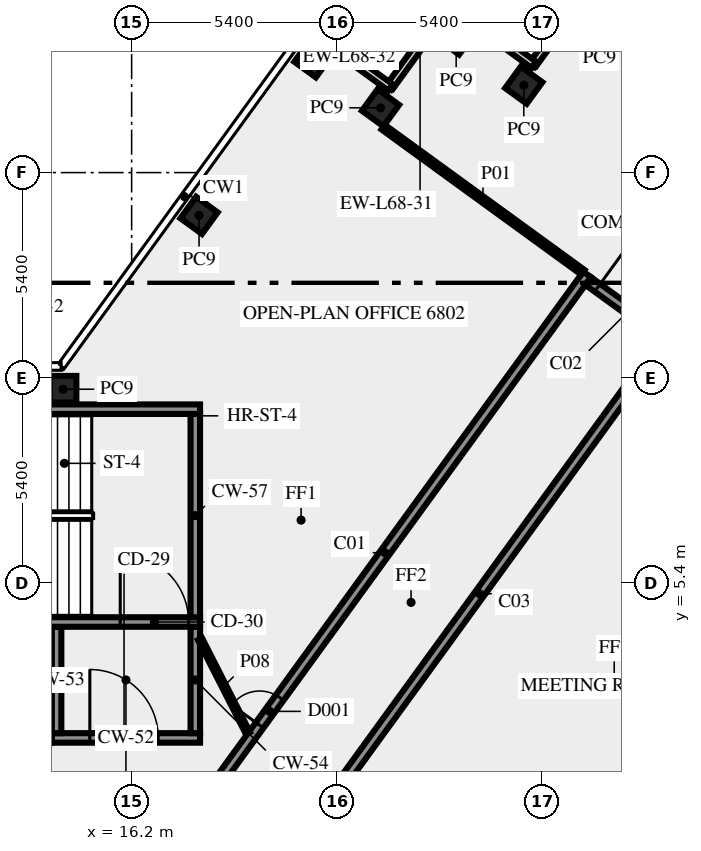
"""IFC4 building model, lengths in metres.
Left out: names, types, materials, properties, quantities, classifications, styles, units other than length and angle.
Written with IfcOpenShell. Run it as: python <this file> out.ifc"""

import sys

from ifc_helpers import new_model, si_unit, direction, frame, frame_2d, origin, origin_2d, place, context, subcontext, project, spatial, rectangle, extrude, element, fill, save


model = new_model("IFC4")
c1 = context("Model", 3, precision=1e-05, world=origin(), true_north=direction((0.0, 1.0)))
c2 = subcontext(c1, "Body", "Model", "MODEL_VIEW")
j1 = project(units=[si_unit("LENGTHUNIT", "METRE"), si_unit("PLANEANGLEUNIT", "RADIAN")], contexts=[c1])
p1 = place(None, origin())
s1 = spatial("IfcSite", under=j1, at=p1, CompositionType="ELEMENT")
p2 = place(p1, origin())
s2 = spatial("IfcBuilding", under=s1, at=p2, CompositionType="ELEMENT")
p3 = place(p2, frame((0.0, 0.0, 293.0)))
s3 = spatial("IfcBuildingStorey", under=s2, at=p3, CompositionType="ELEMENT", Elevation=293.0)
for number, where, z_axis, x_axis in (
    (1, (26.519, 18.5, 0.0), (0.0, 0.0, 1.0), (-0.809, 0.588, 0.0)),
    (2, (24.74, 19.795, 0.0), (0.0, 0.0, 1.0), (-0.588, -0.809, 0.0)),
    (3, (22.749, 17.904, 0.0), (0.0, 0.0, 1.0), (-0.588, -0.809, 0.0)),
    (4, (20.97, 19.195, 0.0), (0.0, 0.0, 1.0), (-0.588, -0.809, 0.0)),
    (5, (17.974, 15.075, 0.0), (0.0, 0.0, 1.0), (-0.588, -0.809, 0.0)),
    (6, (14.395, 10.5, 0.0), (0.0, 0.0, 1.0), (-1.0, 0.0, 0.0)),
):
    element("IfcColumn", number, at=place(p3, frame(where, z_axis=z_axis, x_axis=x_axis)), inside=s3, PredefinedType="COLUMN", context=c2, shape_type="SweptSolid", body=[
        extrude(rectangle(XDim=0.7, YDim=0.7, at=origin_2d()), origin(), (0.0, 0.0, 1.0), 3.65),
    ])
for number, where, z_axis, x_axis in (
    (7, (28.354, 21.247, 0.0), (0.0, 0.0, 1.0), (-0.588, -0.809, 0.0)),
    (8, (26.785, 19.036, 0.0), (0.0, 0.0, 1.0), (-0.809, 0.588, 0.0)),
):
    element("IfcWall", number, at=place(p3, frame(where, z_axis=z_axis, x_axis=x_axis)), inside=s3, PredefinedType="SOLIDWALL", context=c2, shape_type="SweptSolid", body=[
        extrude(rectangle(XDim=2.7, YDim=0.2, at=frame_2d((1.35, 0.0))), origin(), (0.0, 0.0, 1.0), 3.65),
    ])
for number, where, z_axis, x_axis in (
    (9, (24.583, 20.65, 0.0), (0.0, 0.0, 1.0), (-0.588, -0.809, 0.0)),
    (10, (23.013, 18.438, 0.0), (0.0, 0.0, 1.0), (-0.809, 0.588, 0.0)),
):
    element("IfcWall", number, at=place(p3, frame(where, z_axis=z_axis, x_axis=x_axis)), inside=s3, PredefinedType="SOLIDWALL", context=c2, shape_type="SweptSolid", body=[
        extrude(rectangle(XDim=2.7, YDim=0.2, at=frame_2d((1.35, 0.0))), origin(), (0.0, 0.0, 1.0), 3.65),
    ])
p4 = place(p3, frame((14.1, 1.325, 0.0), z_axis=(0.0, 0.0, 1.0), x_axis=(1.0, 0.0, 0.0)))
e11 = element("IfcWall", 11, at=p4, inside=s3, PredefinedType="SHEAR", context=c2, shape_type="SweptSolid", body=[
    extrude(rectangle(XDim=3.9, YDim=0.25, at=frame_2d((1.95, 0.0))), origin(), (0.0, 0.0, 1.0), 3.65),
])
p5 = place(p4, frame((1.0, 0.0, 0.0)))
e12 = element("IfcOpeningElement", 12, at=p5, cuts=e11, PredefinedType="OPENING", context=c2, shape_type="SweptSolid", body=[
    extrude(rectangle(XDim=1.8, YDim=2.1, at=frame_2d((0.9, 1.05))), frame((0.0, 0.135, 0.0), z_axis=(0.0, -1.0, 0.0), x_axis=(1.0, 0.0, 0.0)), (0.0, 0.0, 1.0), 0.27),
])
for number, where, z_axis, x_axis in (
    (13, (14.225, 1.45, 0.0), (0.0, 0.0, 1.0), (0.0, 1.0, 0.0)),
    (14, (17.875, 1.45, 0.0), (0.0, 0.0, 1.0), (0.0, 1.0, 0.0)),
):
    element("IfcWall", number, at=place(p3, frame(where, z_axis=z_axis, x_axis=x_axis)), inside=s3, PredefinedType="SHEAR", context=c2, shape_type="SweptSolid", body=[
        extrude(rectangle(XDim=2.8, YDim=0.25, at=frame_2d((1.4, 0.0))), origin(), (0.0, 0.0, 1.0), 3.65),
    ])
p6 = place(p3, frame((7.5, 4.375, 0.0), z_axis=(0.0, 0.0, 1.0), x_axis=(1.0, 0.0, 0.0)))
e15 = element("IfcWall", 15, at=p6, inside=s3, PredefinedType="SHEAR", context=c2, shape_type="SweptSolid", body=[
    extrude(rectangle(XDim=10.5, YDim=0.25, at=frame_2d((5.25, 0.0))), origin(), (0.0, 0.0, 1.0), 3.65),
])
p7 = place(p6, frame((8.4, 0.0, 0.0)))
e16 = element("IfcOpeningElement", 16, at=p7, cuts=e15, PredefinedType="OPENING", context=c2, shape_type="SweptSolid", body=[
    extrude(rectangle(XDim=1.8, YDim=2.1, at=frame_2d((0.9, 1.05))), frame((0.0, 0.135, 0.0), z_axis=(0.0, -1.0, 0.0), x_axis=(1.0, 0.0, 0.0)), (0.0, 0.0, 1.0), 0.27),
])
p8 = place(p3, frame((17.875, 4.5, 0.0), z_axis=(0.0, 0.0, 1.0), x_axis=(0.0, 1.0, 0.0)))
e17 = element("IfcWall", 17, at=p8, inside=s3, PredefinedType="SHEAR", context=c2, shape_type="SweptSolid", body=[
    extrude(rectangle(XDim=5.35, YDim=0.25, at=frame_2d((2.675, 0.0))), origin(), (0.0, 0.0, 1.0), 3.65),
])
p9 = place(p3, frame((7.5, 9.975, 0.0), z_axis=(0.0, 0.0, 1.0), x_axis=(1.0, 0.0, 0.0)))
e18 = element("IfcWall", 18, at=p9, inside=s3, PredefinedType="SHEAR", context=c2, shape_type="SweptSolid", body=[
    extrude(rectangle(XDim=10.5, YDim=0.25, at=frame_2d((5.25, 0.0))), origin(), (0.0, 0.0, 1.0), 3.65),
])
p10 = place(p9, frame((2.0, 0.0, 1.0)))
e19 = element("IfcOpeningElement", 19, at=p10, cuts=e18, PredefinedType="OPENING", context=c2, shape_type="SweptSolid", body=[
    extrude(rectangle(XDim=1.2, YDim=1.2, at=frame_2d((0.6, 0.6))), frame((0.0, 0.135, 0.0), z_axis=(0.0, -1.0, 0.0), x_axis=(1.0, 0.0, 0.0)), (0.0, 0.0, 1.0), 0.27),
])
p11 = place(p3, frame((17.545, -1.125, 0.0), z_axis=(0.0, 0.0, 1.0), x_axis=(0.58779555165, 0.809009511354, 0.0)))
e20 = element("IfcWall", 20, at=p11, inside=s3, PredefinedType="SOLIDWALL", context=c2, shape_type="SweptSolid", body=[
    extrude(rectangle(XDim=18.103, YDim=0.25, at=frame_2d((9.052, 0.0))), origin(), (0.0, 0.0, 1.0), 3.65),
])
p12 = place(p11, frame((3.441, 0.0, 0.0)))
e21 = element("IfcOpeningElement", 21, at=p12, cuts=e20, PredefinedType="OPENING", context=c2, shape_type="SweptSolid", body=[
    extrude(rectangle(XDim=0.9, YDim=2.1, at=frame_2d((0.45, 1.05))), frame((0.0, 0.135, 0.0), z_axis=(0.0, -1.0, 0.0), x_axis=(1.0, 0.0, 0.0)), (0.0, 0.0, 1.0), 0.27),
])
p13 = place(p3, frame((28.213, 13.346, 0.0), z_axis=(0.0, 0.0, 1.0), x_axis=(0.809006914995, -0.587799125119, 0.0)))
e22 = element("IfcWall", 22, at=p13, inside=s3, PredefinedType="SOLIDWALL", context=c2, shape_type="SweptSolid", body=[
    extrude(rectangle(XDim=2.65, YDim=0.25, at=frame_2d((1.325, 0.0))), origin(), (0.0, 0.0, 1.0), 3.65),
])
p14 = place(p13, frame((0.3, 0.0, 0.0)))
e23 = element("IfcOpeningElement", 23, at=p14, cuts=e22, PredefinedType="OPENING", context=c2, shape_type="SweptSolid", body=[
    extrude(rectangle(XDim=1.8, YDim=2.1, at=frame_2d((0.9, 1.05))), frame((0.0, 0.135, 0.0), z_axis=(0.0, -1.0, 0.0), x_axis=(1.0, 0.0, 0.0)), (0.0, 0.0, 1.0), 0.27),
])
p15 = place(p3, frame((30.183, 11.761, 0.0), z_axis=(0.0, 0.0, 1.0), x_axis=(-0.587781762867, -0.80901952958, 0.0)))
e24 = element("IfcWall", 24, at=p15, inside=s3, PredefinedType="SOLIDWALL", context=c2, shape_type="SweptSolid", body=[
    extrude(rectangle(XDim=16.42, YDim=0.25, at=frame_2d((8.21, 0.0))), origin(), (0.0, 0.0, 1.0), 3.65),
])
p16 = place(p15, frame((0.225, 0.0, 0.0)))
e25 = element("IfcOpeningElement", 25, at=p16, cuts=e24, PredefinedType="OPENING", context=c2, shape_type="SweptSolid", body=[
    extrude(rectangle(XDim=0.9, YDim=2.1, at=frame_2d((0.45, 1.05))), frame((0.0, 0.135, 0.0), z_axis=(0.0, -1.0, 0.0), x_axis=(1.0, 0.0, 0.0)), (0.0, 0.0, 1.0), 0.27),
])
p17 = place(p3, frame((28.073, 13.578, 0.0), z_axis=(0.0, 0.0, 1.0), x_axis=(-0.809000932727, 0.587807358619, 0.0)))
e26 = element("IfcWall", 26, at=p17, inside=s3, PredefinedType="PARTITIONING", context=c2, shape_type="SweptSolid", body=[
    extrude(rectangle(XDim=6.496, YDim=0.15, at=frame_2d((3.248, 0.0))), origin(), (0.0, 0.0, 1.0), 3.65),
])
p18 = place(p3, frame((18.0, 3.925, 0.0), z_axis=(0.0, 0.0, 1.0), x_axis=(0.453950796792, -0.891026752736, 0.0)))
e27 = element("IfcWall", 27, at=p18, inside=s3, PredefinedType="PARTITIONING", context=c2, shape_type="SweptSolid", body=[
    extrude(rectangle(XDim=2.778, YDim=0.12, at=frame_2d((1.389, 0.0))), origin(), (0.0, 0.0, 1.0), 3.65),
])
p19 = place(p5, origin())
e28 = element("IfcDoor", 28, at=p19, inside=s3, OperationType="DOUBLE_DOOR_SINGLE_SWING", PredefinedType="DOOR", context=c2, shape_type="SweptSolid", body=[
    extrude(rectangle(XDim=1.8, YDim=2.1, at=frame_2d((0.9, 1.05))), frame((0.0, 0.025, 0.0), z_axis=(0.0, -1.0, 0.0), x_axis=(1.0, 0.0, 0.0)), (0.0, 0.0, 1.0), 0.05),
])
fill(e12, e28)
p20 = place(p7, origin())
e29 = element("IfcDoor", 29, at=p20, inside=s3, OperationType="DOUBLE_DOOR_SINGLE_SWING", PredefinedType="DOOR", context=c2, shape_type="SweptSolid", body=[
    extrude(rectangle(XDim=1.8, YDim=2.1, at=frame_2d((0.9, 1.05))), frame((0.0, 0.025, 0.0), z_axis=(0.0, -1.0, 0.0), x_axis=(1.0, 0.0, 0.0)), (0.0, 0.0, 1.0), 0.05),
])
fill(e16, e29)
p21 = place(p12, origin())
e30 = element("IfcDoor", 30, at=p21, inside=s3, OperationType="SINGLE_SWING_LEFT", PredefinedType="DOOR", context=c2, shape_type="SweptSolid", body=[
    extrude(rectangle(XDim=0.9, YDim=2.1, at=frame_2d((0.45, 1.05))), frame((0.0, 0.025, 0.0), z_axis=(0.0, -1.0, 0.0), x_axis=(1.0, 0.0, 0.0)), (0.0, 0.0, 1.0), 0.05),
])
fill(e21, e30)
p22 = place(p14, origin())
e31 = element("IfcDoor", 31, at=p22, inside=s3, OperationType="DOUBLE_DOOR_SINGLE_SWING", PredefinedType="DOOR", context=c2, shape_type="SweptSolid", body=[
    extrude(rectangle(XDim=1.8, YDim=2.1, at=frame_2d((0.9, 1.05))), frame((0.0, 0.025, 0.0), z_axis=(0.0, -1.0, 0.0), x_axis=(1.0, 0.0, 0.0)), (0.0, 0.0, 1.0), 0.05),
])
fill(e23, e31)
save(model, sys.argv[1])
